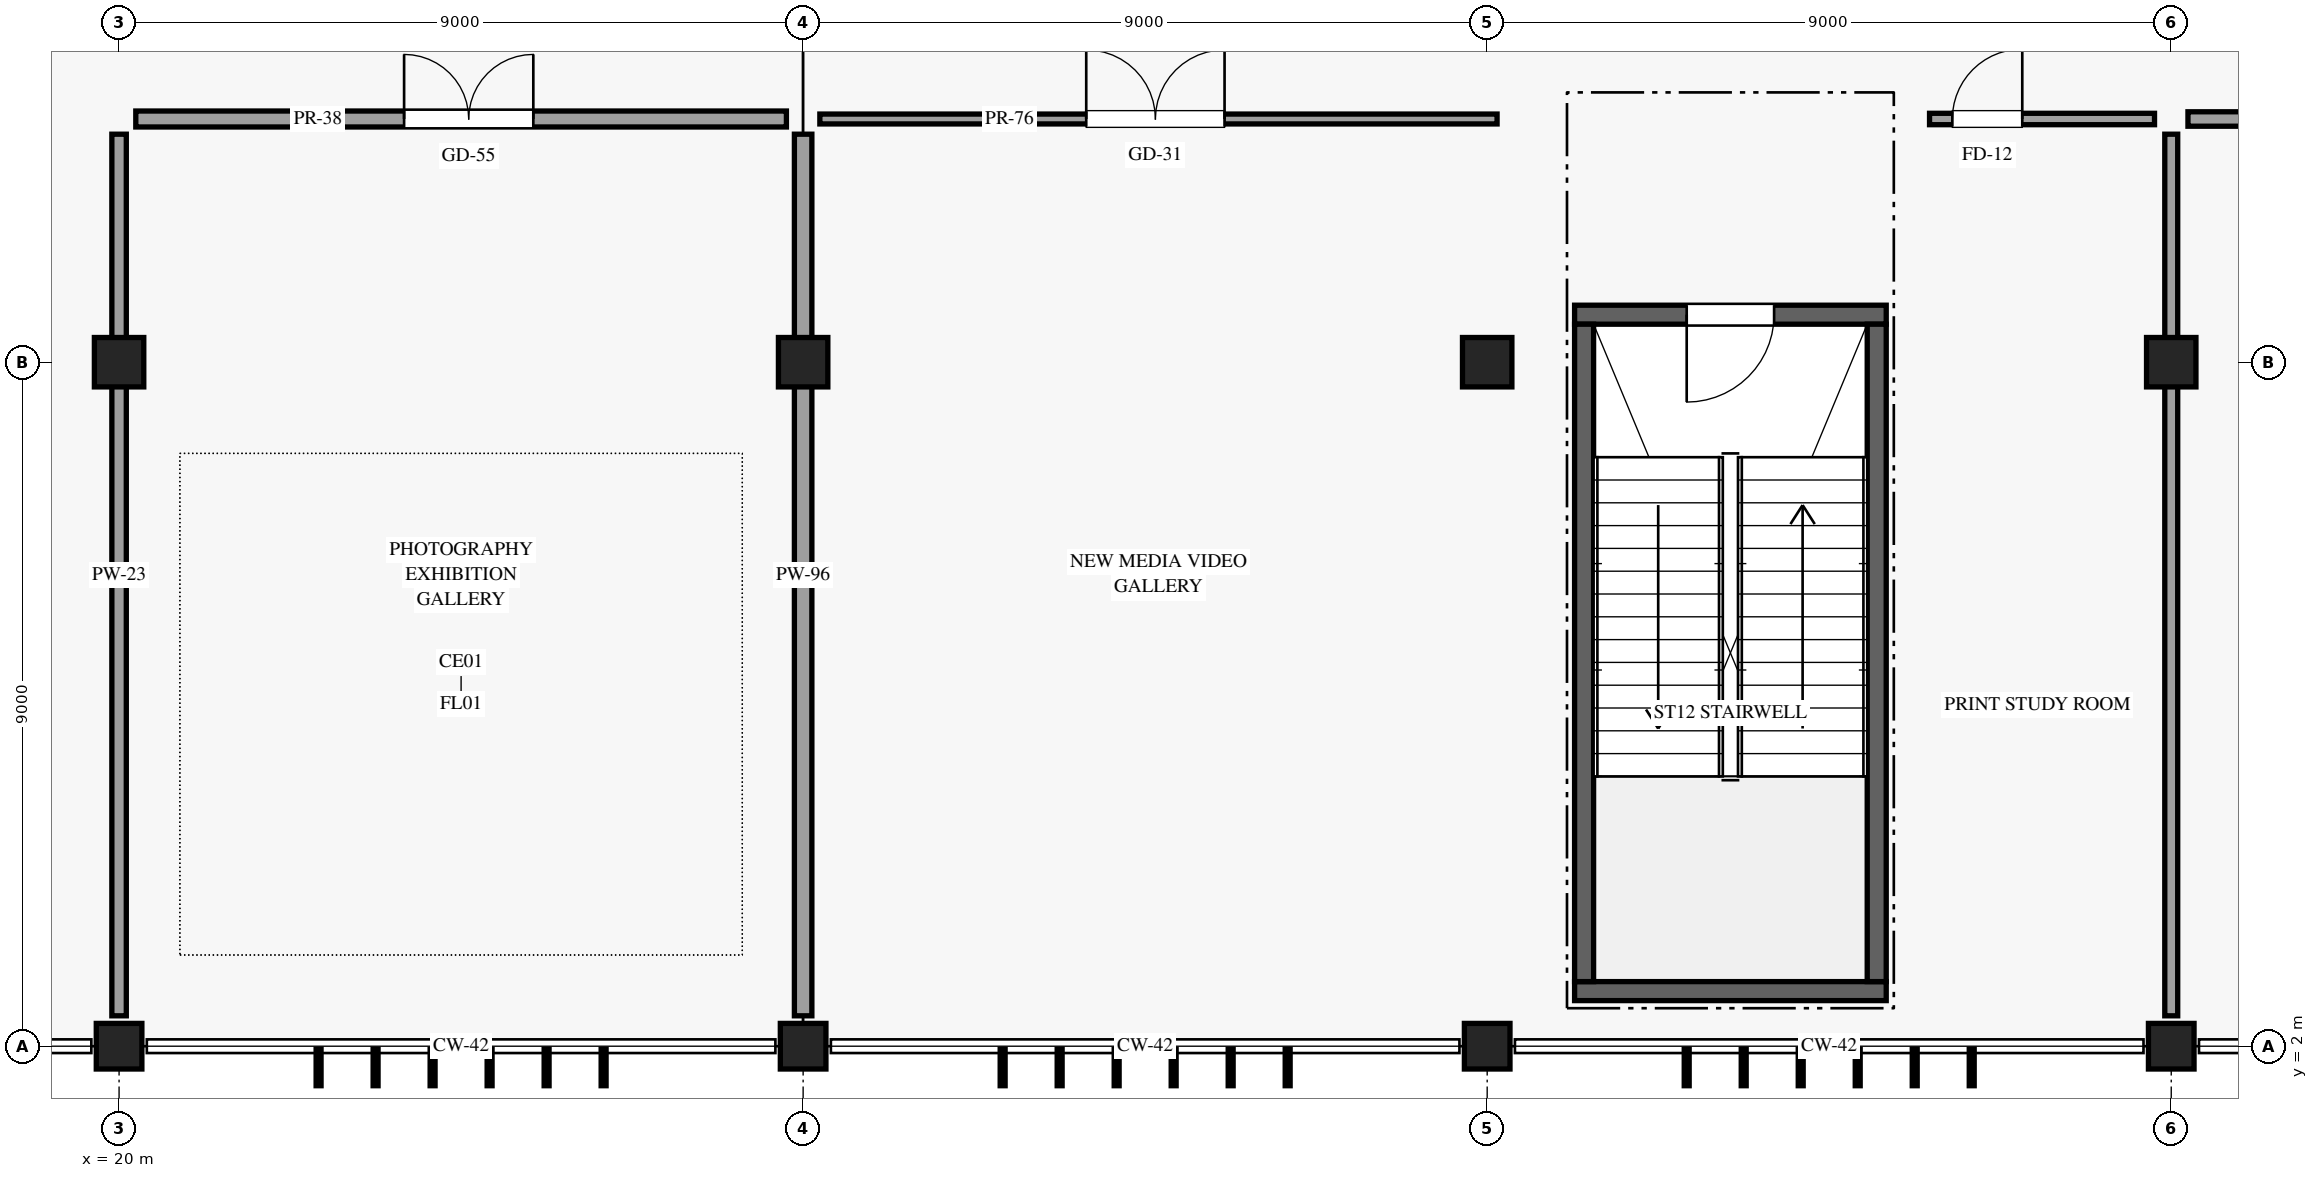
"""IFC4 building model, lengths in metres.
Left out: names, types, materials, properties, quantities, classifications, styles, units other than length and angle.
Written with IfcOpenShell. Run it as: python <this file> out.ifc"""

import sys

from ifc_helpers import new_model, si_unit, direction, frame, frame_2d, origin, origin_2d, place, context, subcontext, project, spatial, rectangle, circle, extrude, element, fill, save


model = new_model("IFC4")
c1 = context("Model", 3, precision=1e-05, world=origin(), true_north=direction((0.0, 1.0)))
c2 = subcontext(c1, "Body", "Model", "MODEL_VIEW")
j1 = project(units=[si_unit("LENGTHUNIT", "METRE"), si_unit("PLANEANGLEUNIT", "RADIAN")], contexts=[c1])
p1 = place(None, origin())
s1 = spatial("IfcSite", under=j1, at=p1, CompositionType="ELEMENT")
p2 = place(p1, origin())
s2 = spatial("IfcBuilding", under=s1, at=p2, CompositionType="ELEMENT")
p3 = place(p2, frame((0.0, 0.0, 15.0)))
s3 = spatial("IfcBuildingStorey", under=s2, at=p3, CompositionType="ELEMENT", Elevation=15.0)
p4 = place(p3, frame((20.0, 2.0, 0.0), z_axis=(0.0, 0.0, 1.0), x_axis=(1.0, 0.0, 0.0)))
e1 = element("IfcColumn", 1, at=p4, inside=s3, PredefinedType="COLUMN", context=c2, shape_type="SweptSolid", body=[
    extrude(rectangle(XDim=0.6, YDim=0.6, at=origin_2d()), origin(), (0.0, 0.0, 1.0), 4.5),
])
p5 = place(p3, frame((20.0, 11.0, 0.0), z_axis=(0.0, 0.0, 1.0), x_axis=(1.0, 0.0, 0.0)))
e2 = element("IfcColumn", 2, at=p5, inside=s3, PredefinedType="COLUMN", context=c2, shape_type="SweptSolid", body=[
    extrude(circle(Radius=0.325, at=origin_2d()), origin(), (0.0, 0.0, 1.0), 4.5),
])
p6 = place(p3, frame((29.0, 2.0, 0.0), z_axis=(0.0, 0.0, 1.0), x_axis=(1.0, 0.0, 0.0)))
e3 = element("IfcColumn", 3, at=p6, inside=s3, PredefinedType="COLUMN", context=c2, shape_type="SweptSolid", body=[
    extrude(rectangle(XDim=0.6, YDim=0.6, at=origin_2d()), origin(), (0.0, 0.0, 1.0), 4.5),
])
p7 = place(p3, frame((29.0, 11.0, 0.0), z_axis=(0.0, 0.0, 1.0), x_axis=(1.0, 0.0, 0.0)))
e4 = element("IfcColumn", 4, at=p7, inside=s3, PredefinedType="COLUMN", context=c2, shape_type="SweptSolid", body=[
    extrude(circle(Radius=0.325, at=origin_2d()), origin(), (0.0, 0.0, 1.0), 4.5),
])
p8 = place(p3, frame((38.0, 2.0, 0.0), z_axis=(0.0, 0.0, 1.0), x_axis=(1.0, 0.0, 0.0)))
e5 = element("IfcColumn", 5, at=p8, inside=s3, PredefinedType="COLUMN", context=c2, shape_type="SweptSolid", body=[
    extrude(rectangle(XDim=0.6, YDim=0.6, at=origin_2d()), origin(), (0.0, 0.0, 1.0), 4.5),
])
p9 = place(p3, frame((38.0, 11.0, 0.0), z_axis=(0.0, 0.0, 1.0), x_axis=(1.0, 0.0, 0.0)))
e6 = element("IfcColumn", 6, at=p9, inside=s3, PredefinedType="COLUMN", context=c2, shape_type="SweptSolid", body=[
    extrude(circle(Radius=0.325, at=origin_2d()), origin(), (0.0, 0.0, 1.0), 4.5),
])
p10 = place(p3, frame((47.0, 2.0, 0.0), z_axis=(0.0, 0.0, 1.0), x_axis=(1.0, 0.0, 0.0)))
e7 = element("IfcColumn", 7, at=p10, inside=s3, PredefinedType="COLUMN", context=c2, shape_type="SweptSolid", body=[
    extrude(rectangle(XDim=0.6, YDim=0.6, at=origin_2d()), origin(), (0.0, 0.0, 1.0), 4.5),
])
p11 = place(p3, frame((47.0, 11.0, 0.0), z_axis=(0.0, 0.0, 1.0), x_axis=(1.0, 0.0, 0.0)))
e8 = element("IfcColumn", 8, at=p11, inside=s3, PredefinedType="COLUMN", context=c2, shape_type="SweptSolid", body=[
    extrude(circle(Radius=0.325, at=origin_2d()), origin(), (0.0, 0.0, 1.0), 4.5),
])
p12 = place(p3, frame((39.15, 11.625, 0.0), z_axis=(0.0, 0.0, 1.0), x_axis=(1.0, 0.0, 0.0)))
e9 = element("IfcWall", 9, at=p12, inside=s3, PredefinedType="SHEAR", context=c2, shape_type="SweptSolid", body=[
    extrude(rectangle(XDim=4.1, YDim=0.25, at=frame_2d((2.05, 0.0))), origin(), (0.0, 0.0, 1.0), 4.18),
])
p13 = place(p12, frame((2.625, 0.0, 0.0), z_axis=(0.0, 0.0, 1.0), x_axis=(-1.0, 0.0, 0.0)))
e10 = element("IfcOpeningElement", 10, at=p13, cuts=e9, PredefinedType="OPENING", context=c2, shape_type="SweptSolid", body=[
    extrude(rectangle(XDim=1.15, YDim=2.2, at=frame_2d((0.575, 1.1))), frame((0.0, 0.135, 0.0), z_axis=(0.0, -1.0, 0.0), x_axis=(1.0, 0.0, 0.0)), (0.0, 0.0, 1.0), 0.27),
])
p14 = place(p3, frame((39.15, 2.725, 0.0), z_axis=(0.0, 0.0, 1.0), x_axis=(1.0, 0.0, 0.0)))
e11 = element("IfcWall", 11, at=p14, inside=s3, PredefinedType="SHEAR", context=c2, shape_type="SweptSolid", body=[
    extrude(rectangle(XDim=4.1, YDim=0.25, at=frame_2d((2.05, 0.0))), origin(), (0.0, 0.0, 1.0), 4.18),
])
for number, where, z_axis, x_axis in (
    (12, (39.275, 2.85, 0.0), (0.0, 0.0, 1.0), (0.0, 1.0, 0.0)),
    (13, (43.125, 2.85, 0.0), (0.0, 0.0, 1.0), (0.0, 1.0, 0.0)),
):
    element("IfcWall", number, at=place(p3, frame(where, z_axis=z_axis, x_axis=x_axis)), inside=s3, PredefinedType="SHEAR", context=c2, shape_type="SweptSolid", body=[
        extrude(rectangle(XDim=8.65, YDim=0.25, at=frame_2d((4.325, 0.0))), origin(), (0.0, 0.0, 1.0), 4.18),
    ])
p15 = place(p3, frame((20.0, 2.4, 0.0), z_axis=(0.0, 0.0, 1.0), x_axis=(0.0, 1.0, 0.0)))
e14 = element("IfcWall", 14, at=p15, inside=s3, PredefinedType="PARTITIONING", context=c2, shape_type="SweptSolid", body=[
    extrude(rectangle(XDim=11.6, YDim=0.19, at=frame_2d((5.8, 0.0))), origin(), (0.0, 0.0, 1.0), 3.575),
])
p16 = place(p3, frame((20.22, 14.2, 0.0), z_axis=(0.0, 0.0, 1.0), x_axis=(1.0, 0.0, 0.0)))
e15 = element("IfcWall", 15, at=p16, inside=s3, PredefinedType="PARTITIONING", context=c2, shape_type="SweptSolid", body=[
    extrude(rectangle(XDim=8.56, YDim=0.21, at=frame_2d((4.28, 0.0))), origin(), (0.0, 0.0, 1.0), 3.575),
])
p17 = place(p16, frame((3.53, 0.0, 0.0)))
e16 = element("IfcOpeningElement", 16, at=p17, cuts=e15, PredefinedType="OPENING", context=c2, shape_type="SweptSolid", body=[
    extrude(rectangle(XDim=1.7, YDim=2.44, at=frame_2d((0.85, 1.22))), frame((0.0, 0.115, 0.0), z_axis=(0.0, -1.0, 0.0), x_axis=(1.0, 0.0, 0.0)), (0.0, 0.0, 1.0), 0.23),
])
p18 = place(p3, frame((29.0, 2.4, 0.0), z_axis=(0.0, 0.0, 1.0), x_axis=(0.0, 1.0, 0.0)))
e17 = element("IfcWall", 17, at=p18, inside=s3, PredefinedType="PARTITIONING", context=c2, shape_type="SweptSolid", body=[
    extrude(rectangle(XDim=11.6, YDim=0.23, at=frame_2d((5.8, 0.0))), origin(), (0.0, 0.0, 1.0), 3.575),
])
p19 = place(p3, frame((29.22, 14.2, 0.0), z_axis=(0.0, 0.0, 1.0), x_axis=(1.0, 0.0, 0.0)))
e18 = element("IfcWall", 18, at=p19, inside=s3, PredefinedType="PARTITIONING", context=c2, shape_type="SweptSolid", body=[
    extrude(rectangle(XDim=8.91, YDim=0.13, at=frame_2d((4.455, 0.0))), origin(), (0.0, 0.0, 1.0), 3.575),
])
p20 = place(p19, frame((3.505, 0.0, 0.0)))
e19 = element("IfcOpeningElement", 19, at=p20, cuts=e18, PredefinedType="OPENING", context=c2, shape_type="SweptSolid", body=[
    extrude(rectangle(XDim=1.82, YDim=2.46, at=frame_2d((0.91, 1.23))), frame((0.0, 0.075, 0.0), z_axis=(0.0, -1.0, 0.0), x_axis=(1.0, 0.0, 0.0)), (0.0, 0.0, 1.0), 0.15),
])
p21 = place(p3, frame((43.82, 14.2, 0.0), z_axis=(0.0, 0.0, 1.0), x_axis=(1.0, 0.0, 0.0)))
e20 = element("IfcWall", 20, at=p21, inside=s3, PredefinedType="PARTITIONING", context=c2, shape_type="SweptSolid", body=[
    extrude(rectangle(XDim=2.96, YDim=0.15, at=frame_2d((1.48, 0.0))), origin(), (0.0, 0.0, 1.0), 3.575),
])
p22 = place(p21, frame((0.3, 0.0, 0.0)))
e21 = element("IfcOpeningElement", 21, at=p22, cuts=e20, PredefinedType="OPENING", context=c2, shape_type="SweptSolid", body=[
    extrude(rectangle(XDim=0.92, YDim=2.12, at=frame_2d((0.46, 1.06))), frame((0.0, 0.085, 0.0), z_axis=(0.0, -1.0, 0.0), x_axis=(1.0, 0.0, 0.0)), (0.0, 0.0, 1.0), 0.17),
])
p23 = place(p3, frame((47.0, 2.4, 0.0), z_axis=(0.0, 0.0, 1.0), x_axis=(0.0, 1.0, 0.0)))
e22 = element("IfcWall", 22, at=p23, inside=s3, PredefinedType="PARTITIONING", context=c2, shape_type="SweptSolid", body=[
    extrude(rectangle(XDim=11.6, YDim=0.17, at=frame_2d((5.8, 0.0))), origin(), (0.0, 0.0, 1.0), 3.575),
])
p24 = place(p3, frame((47.22, 14.2, 0.0), z_axis=(0.0, 0.0, 1.0), x_axis=(1.0, 0.0, 0.0)))
e23 = element("IfcWall", 23, at=p24, inside=s3, PredefinedType="PARTITIONING", context=c2, shape_type="SweptSolid", body=[
    extrude(rectangle(XDim=8.56, YDim=0.19, at=frame_2d((4.28, 0.0))), origin(), (0.0, 0.0, 1.0), 3.575),
])
p25 = place(p24, frame((3.78, 0.0, 0.0)))
e24 = element("IfcOpeningElement", 24, at=p25, cuts=e23, PredefinedType="OPENING", context=c2, shape_type="SweptSolid", body=[
    extrude(rectangle(XDim=0.98, YDim=2.18, at=frame_2d((0.49, 1.09))), frame((0.0, 0.105, 0.0), z_axis=(0.0, -1.0, 0.0), x_axis=(1.0, 0.0, 0.0)), (0.0, 0.0, 1.0), 0.21),
])
p26 = place(p13, origin())
e25 = element("IfcDoor", 25, at=p26, inside=s3, OperationType="SINGLE_SWING_RIGHT", PredefinedType="DOOR", context=c2, shape_type="SweptSolid", body=[
    extrude(rectangle(XDim=1.15, YDim=2.2, at=frame_2d((0.575, 1.1))), frame((0.0, 0.025, 0.0), z_axis=(0.0, -1.0, 0.0), x_axis=(1.0, 0.0, 0.0)), (0.0, 0.0, 1.0), 0.05),
])
fill(e10, e25)
p27 = place(p17, origin())
e26 = element("IfcDoor", 26, at=p27, inside=s3, OperationType="DOUBLE_DOOR_SINGLE_SWING", PredefinedType="DOOR", context=c2, shape_type="SweptSolid", body=[
    extrude(rectangle(XDim=1.7, YDim=2.44, at=frame_2d((0.85, 1.22))), frame((0.0, 0.025, 0.0), z_axis=(0.0, -1.0, 0.0), x_axis=(1.0, 0.0, 0.0)), (0.0, 0.0, 1.0), 0.05),
])
fill(e16, e26)
p28 = place(p20, origin())
e27 = element("IfcDoor", 27, at=p28, inside=s3, OperationType="DOUBLE_DOOR_SINGLE_SWING", PredefinedType="DOOR", context=c2, shape_type="SweptSolid", body=[
    extrude(rectangle(XDim=1.82, YDim=2.46, at=frame_2d((0.91, 1.23))), frame((0.0, 0.025, 0.0), z_axis=(0.0, -1.0, 0.0), x_axis=(1.0, 0.0, 0.0)), (0.0, 0.0, 1.0), 0.05),
])
fill(e19, e27)
p29 = place(p22, origin())
e28 = element("IfcDoor", 28, at=p29, inside=s3, OperationType="SINGLE_SWING_RIGHT", PredefinedType="DOOR", context=c2, shape_type="SweptSolid", body=[
    extrude(rectangle(XDim=0.92, YDim=2.12, at=frame_2d((0.46, 1.06))), frame((0.0, 0.025, 0.0), z_axis=(0.0, -1.0, 0.0), x_axis=(1.0, 0.0, 0.0)), (0.0, 0.0, 1.0), 0.05),
])
fill(e21, e28)
save(model, sys.argv[1])
